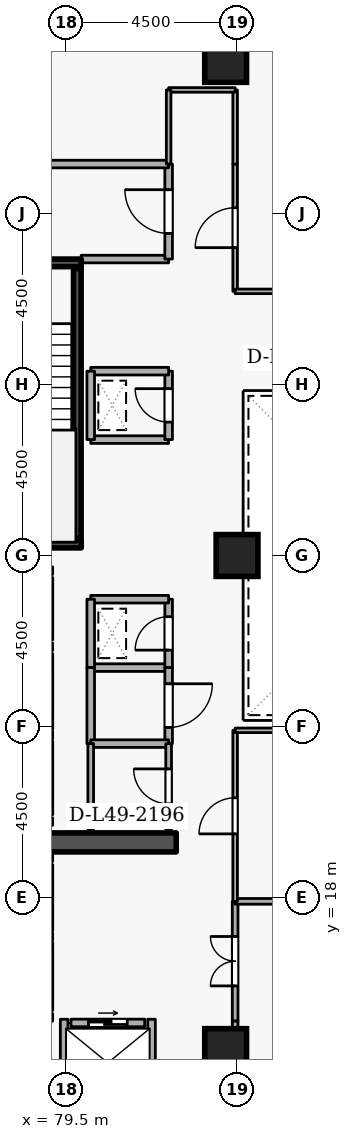
"""IFC4 building model, lengths in metres.
Left out: names, types, materials, properties, quantities, classifications, styles, units other than length and angle.
Written with IfcOpenShell. Run it as: python <this file> out.ifc"""

import sys

from ifc_helpers import new_model, si_unit, direction, frame, frame_2d, origin, origin_2d, place, context, subcontext, project, spatial, rectangle, extrude, element, fill, save


model = new_model("IFC4")
c1 = context("Model", 3, precision=1e-05, world=origin(), true_north=direction((0.0, 1.0)))
c2 = subcontext(c1, "Body", "Model", "MODEL_VIEW")
j1 = project(units=[si_unit("LENGTHUNIT", "METRE"), si_unit("PLANEANGLEUNIT", "RADIAN")], contexts=[c1])
p1 = place(None, origin())
s1 = spatial("IfcSite", under=j1, at=p1, CompositionType="ELEMENT")
p2 = place(p1, origin())
s2 = spatial("IfcBuilding", under=s1, at=p2, CompositionType="ELEMENT")
p3 = place(p2, frame((0.0, 0.0, 185.7)))
s3 = spatial("IfcBuildingStorey", under=s2, at=p3, CompositionType="ELEMENT", Elevation=185.7)
p4 = place(p3, frame((76.6, 19.45, 0.0), z_axis=(0.0, 0.0, 1.0), x_axis=(1.0, 0.0, 0.0)))
e1 = element("IfcWall", 1, at=p4, inside=s3, PredefinedType="SHEAR", context=c2, shape_type="SweptSolid", body=[
    extrude(rectangle(XDim=5.8, YDim=0.5, at=frame_2d((2.9, 0.0))), origin(), (0.0, 0.0, 1.0), 3.6),
])
for number, where, z_axis, x_axis in (
    (2, (83.7, 14.0, 0.0), (0.0, 0.0, 1.0), (1.0, 0.0, 0.0)),
    (3, (83.7, 40.0, 0.0), (0.0, 0.0, 1.0), (1.0, 0.0, 0.0)),
    (4, (84.0, 27.0, 0.0), (0.0, 0.0, 1.0), (1.0, 0.0, 0.0)),
):
    element("IfcColumn", number, at=place(p3, frame(where, z_axis=z_axis, x_axis=x_axis)), inside=s3, PredefinedType="COLUMN", context=c2, shape_type="SweptSolid", body=[
        extrude(rectangle(XDim=1.1, YDim=1.1, at=origin_2d()), origin(), (0.0, 0.0, 1.0), 3.6),
    ])
p5 = place(p3, frame((79.05, 24.78, 0.0), z_axis=(0.0, 0.0, 1.0), x_axis=(0.0, 1.0, 0.0)))
e5 = element("IfcWall", 5, at=p5, inside=s3, PredefinedType="STANDARD", context=c2, shape_type="SweptSolid", body=[
    extrude(rectangle(XDim=1.64, YDim=0.2, at=frame_2d((0.82, 0.0))), origin(), (0.0, 0.0, 1.0), 3.34),
])
p6 = place(p5, frame((0.31, 0.0, 0.0)))
e6 = element("IfcOpeningElement", 6, at=p6, cuts=e5, PredefinedType="OPENING", context=c2, shape_type="SweptSolid", body=[
    extrude(rectangle(XDim=1.02, YDim=2.06, at=frame_2d((0.51, 1.03))), frame((0.0, 0.11, 0.0), z_axis=(0.0, -1.0, 0.0), x_axis=(1.0, 0.0, 0.0)), (0.0, 0.0, 1.0), 0.22),
])
p7 = place(p3, frame((79.05, 22.43, 0.0), z_axis=(0.0, 0.0, 1.0), x_axis=(0.0, 1.0, 0.0)))
e7 = element("IfcWall", 7, at=p7, inside=s3, PredefinedType="STANDARD", context=c2, shape_type="SweptSolid", body=[
    extrude(rectangle(XDim=1.99, YDim=0.2, at=frame_2d((0.995, 0.0))), origin(), (0.0, 0.0, 1.0), 3.34),
])
p8 = place(p7, frame((0.485, 0.0, 0.0)))
e8 = element("IfcOpeningElement", 8, at=p8, cuts=e7, PredefinedType="OPENING", context=c2, shape_type="SweptSolid", body=[
    extrude(rectangle(XDim=1.02, YDim=2.06, at=frame_2d((0.51, 1.03))), frame((0.0, 0.11, 0.0), z_axis=(0.0, -1.0, 0.0), x_axis=(1.0, 0.0, 0.0)), (0.0, 0.0, 1.0), 0.22),
])
p9 = place(p3, frame((79.05, 20.18, 0.0), z_axis=(0.0, 0.0, 1.0), x_axis=(0.0, 1.0, 0.0)))
e9 = element("IfcWall", 9, at=p9, inside=s3, PredefinedType="STANDARD", context=c2, shape_type="SweptSolid", body=[
    extrude(rectangle(XDim=1.94, YDim=0.2, at=frame_2d((0.97, 0.0))), origin(), (0.0, 0.0, 1.0), 3.34),
])
p10 = place(p9, frame((0.46, 0.0, 0.0)))
e10 = element("IfcOpeningElement", 10, at=p10, cuts=e9, PredefinedType="OPENING", context=c2, shape_type="SweptSolid", body=[
    extrude(rectangle(XDim=1.02, YDim=2.06, at=frame_2d((0.51, 1.03))), frame((0.0, 0.11, 0.0), z_axis=(0.0, -1.0, 0.0), x_axis=(1.0, 0.0, 0.0)), (0.0, 0.0, 1.0), 0.22),
])
p11 = place(p3, frame((79.05, 17.13, 0.0), z_axis=(0.0, 0.0, 1.0), x_axis=(0.0, 1.0, 0.0)))
e11 = element("IfcWall", 11, at=p11, inside=s3, PredefinedType="STANDARD", context=c2, shape_type="SweptSolid", body=[
    extrude(rectangle(XDim=1.74, YDim=0.2, at=frame_2d((0.87, 0.0))), origin(), (0.0, 0.0, 1.0), 3.34),
])
p12 = place(p11, frame((0.36, 0.0, 0.0)))
e12 = element("IfcOpeningElement", 12, at=p12, cuts=e11, PredefinedType="OPENING", context=c2, shape_type="SweptSolid", body=[
    extrude(rectangle(XDim=1.02, YDim=2.06, at=frame_2d((0.51, 1.03))), frame((0.0, 0.11, 0.0), z_axis=(0.0, -1.0, 0.0), x_axis=(1.0, 0.0, 0.0)), (0.0, 0.0, 1.0), 0.22),
])
p13 = place(p3, frame((79.05, 15.03, 0.0), z_axis=(0.0, 0.0, 1.0), x_axis=(0.0, 1.0, 0.0)))
e13 = element("IfcWall", 13, at=p13, inside=s3, PredefinedType="STANDARD", context=c2, shape_type="SweptSolid", body=[
    extrude(rectangle(XDim=1.79, YDim=0.2, at=frame_2d((0.895, 0.0))), origin(), (0.0, 0.0, 1.0), 3.34),
])
p14 = place(p13, frame((0.385, 0.0, 0.0)))
e14 = element("IfcOpeningElement", 14, at=p14, cuts=e13, PredefinedType="OPENING", context=c2, shape_type="SweptSolid", body=[
    extrude(rectangle(XDim=1.02, YDim=2.06, at=frame_2d((0.51, 1.03))), frame((0.0, 0.11, 0.0), z_axis=(0.0, -1.0, 0.0), x_axis=(1.0, 0.0, 0.0)), (0.0, 0.0, 1.0), 0.22),
])
p15 = place(p3, frame((79.63, 14.7, 0.0), z_axis=(0.0, 0.0, 1.0), x_axis=(1.0, 0.0, 0.0)))
e15 = element("IfcWall", 15, at=p15, inside=s3, PredefinedType="STANDARD", context=c2, shape_type="SweptSolid", body=[
    extrude(rectangle(XDim=1.94, YDim=0.2, at=frame_2d((0.97, 0.0))), origin(), (0.0, 0.0, 1.0), 3.34),
])
p16 = place(p15, frame((0.46, 0.0, 0.0)))
e16 = element("IfcOpeningElement", 16, at=p16, cuts=e15, PredefinedType="OPENING", context=c2, shape_type="SweptSolid", body=[
    extrude(rectangle(XDim=1.02, YDim=2.06, at=frame_2d((0.51, 1.03))), frame((0.0, 0.11, 0.0), z_axis=(0.0, -1.0, 0.0), x_axis=(1.0, 0.0, 0.0)), (0.0, 0.0, 1.0), 0.22),
])
for number, where, z_axis, x_axis in (
    (17, (81.75, 12.612, 0.0), (0.0, 0.0, 1.0), (0.0, 1.0, 0.0)),
    (18, (79.45, 12.612, 0.0), (0.0, 0.0, 1.0), (0.0, 1.0, 0.0)),
):
    element("IfcWall", number, at=place(p3, frame(where, z_axis=z_axis, x_axis=x_axis)), inside=s3, PredefinedType="STANDARD", context=c2, shape_type="SweptSolid", body=[
        extrude(rectangle(XDim=2.186, YDim=0.2, at=frame_2d((1.093, 0.0))), origin(), (0.0, 0.0, 1.0), 3.34),
    ])
p17 = place(p3, frame((76.55, 34.7, 0.0), z_axis=(0.0, 0.0, 1.0), x_axis=(1.0, 0.0, 0.0)))
e19 = element("IfcWall", 19, at=p17, inside=s3, PredefinedType="SHEAR", context=c2, shape_type="SweptSolid", body=[
    extrude(rectangle(XDim=3.35, YDim=0.2, at=frame_2d((1.675, 0.0))), origin(), (0.0, 0.0, 1.0), 3.6),
])
p18 = place(p17, frame((1.125, 0.0, 0.0)))
e20 = element("IfcOpeningElement", 20, at=p18, cuts=e19, PredefinedType="OPENING", context=c2, shape_type="SweptSolid", body=[
    extrude(rectangle(XDim=1.1, YDim=2.1, at=frame_2d((0.55, 1.05))), frame((0.0, 0.11, 0.0), z_axis=(0.0, -1.0, 0.0), x_axis=(1.0, 0.0, 0.0)), (0.0, 0.0, 1.0), 0.22),
])
p19 = place(p3, frame((79.9, 27.3, 0.0), z_axis=(0.0, 0.0, 1.0), x_axis=(-1.0, 0.0, 0.0)))
e21 = element("IfcWall", 21, at=p19, inside=s3, PredefinedType="SHEAR", context=c2, shape_type="SweptSolid", body=[
    extrude(rectangle(XDim=3.35, YDim=0.2, at=frame_2d((1.675, 0.0))), origin(), (0.0, 0.0, 1.0), 3.6),
])
p20 = place(p3, frame((79.797, 27.45, 0.0), z_axis=(0.0, 0.0, 1.0), x_axis=(0.0, 1.0, 0.0)))
e22 = element("IfcWall", 22, at=p20, inside=s3, PredefinedType="SHEAR", context=c2, shape_type="SweptSolid", body=[
    extrude(rectangle(XDim=7.1, YDim=0.2, at=frame_2d((3.55, 0.0))), origin(), (0.0, 0.0, 1.0), 3.6),
])
p21 = place(p3, frame((79.9, 34.8, 0.0), z_axis=(0.0, 0.0, 1.0), x_axis=(1.0, 0.0, 0.0)))
e23 = element("IfcWall", 23, at=p21, inside=s3, PredefinedType="STANDARD", context=c2, shape_type="SweptSolid", body=[
    extrude(rectangle(XDim=2.3, YDim=0.2, at=frame_2d((1.15, 0.0))), origin(), (0.0, 0.0, 1.0), 2.545),
])
p22 = place(p3, frame((82.2, 34.8, 0.0), z_axis=(0.0, 0.0, 1.0), x_axis=(0.0, 1.0, 0.0)))
e24 = element("IfcWall", 24, at=p22, inside=s3, PredefinedType="STANDARD", context=c2, shape_type="SweptSolid", body=[
    extrude(rectangle(XDim=2.5, YDim=0.2, at=frame_2d((1.25, 0.0))), origin(), (0.0, 0.0, 1.0), 3.34),
])
p23 = place(p22, frame((0.675, 0.0, 0.0)))
e25 = element("IfcOpeningElement", 25, at=p23, cuts=e24, PredefinedType="OPENING", context=c2, shape_type="SweptSolid", body=[
    extrude(rectangle(XDim=1.15, YDim=2.1, at=frame_2d((0.575, 1.05))), frame((0.0, 0.11, 0.0), z_axis=(0.0, -1.0, 0.0), x_axis=(1.0, 0.0, 0.0)), (0.0, 0.0, 1.0), 0.22),
])
p24 = place(p3, frame((82.2, 37.3, 0.0), z_axis=(0.0, 0.0, 1.0), x_axis=(-1.0, 0.0, 0.0)))
e26 = element("IfcWall", 26, at=p24, inside=s3, PredefinedType="STANDARD", context=c2, shape_type="SweptSolid", body=[
    extrude(rectangle(XDim=5.7, YDim=0.2, at=frame_2d((2.85, 0.0))), origin(), (0.0, 0.0, 1.0), 3.34),
])
p25 = place(p3, frame((80.15, 24.05, 0.0), z_axis=(0.0, 0.0, 1.0), x_axis=(1.0, 0.0, 0.0)))
e27 = element("IfcWall", 27, at=p25, inside=s3, PredefinedType="STANDARD", context=c2, shape_type="SweptSolid", body=[
    extrude(rectangle(XDim=2.05, YDim=0.2, at=frame_2d((1.025, 0.0))), origin(), (0.0, 0.0, 1.0), 3.34),
])
p26 = place(p3, frame((82.2, 24.05, 0.0), z_axis=(0.0, 0.0, 1.0), x_axis=(0.0, 1.0, 0.0)))
e28 = element("IfcWall", 28, at=p26, inside=s3, PredefinedType="STANDARD", context=c2, shape_type="SweptSolid", body=[
    extrude(rectangle(XDim=1.8, YDim=0.2, at=frame_2d((0.9, 0.0))), origin(), (0.0, 0.0, 1.0), 3.34),
])
p27 = place(p26, frame((0.46, 0.0, 0.0)))
e29 = element("IfcOpeningElement", 29, at=p27, cuts=e28, PredefinedType="OPENING", context=c2, shape_type="SweptSolid", body=[
    extrude(rectangle(XDim=0.88, YDim=2.04, at=frame_2d((0.44, 1.02))), frame((0.0, 0.11, 0.0), z_axis=(0.0, -1.0, 0.0), x_axis=(1.0, 0.0, 0.0)), (0.0, 0.0, 1.0), 0.22),
])
p28 = place(p3, frame((82.2, 25.85, 0.0), z_axis=(0.0, 0.0, 1.0), x_axis=(-1.0, 0.0, 0.0)))
e30 = element("IfcWall", 30, at=p28, inside=s3, PredefinedType="STANDARD", context=c2, shape_type="SweptSolid", body=[
    extrude(rectangle(XDim=2.05, YDim=0.2, at=frame_2d((1.025, 0.0))), origin(), (0.0, 0.0, 1.0), 3.34),
])
p29 = place(p3, frame((80.15, 25.85, 0.0), z_axis=(0.0, 0.0, 1.0), x_axis=(0.0, -1.0, 0.0)))
e31 = element("IfcWall", 31, at=p29, inside=s3, PredefinedType="STANDARD", context=c2, shape_type="SweptSolid", body=[
    extrude(rectangle(XDim=1.8, YDim=0.2, at=frame_2d((0.9, 0.0))), origin(), (0.0, 0.0, 1.0), 3.34),
])
p30 = place(p3, frame((80.15, 30.05, 0.0), z_axis=(0.0, 0.0, 1.0), x_axis=(1.0, 0.0, 0.0)))
e32 = element("IfcWall", 32, at=p30, inside=s3, PredefinedType="STANDARD", context=c2, shape_type="SweptSolid", body=[
    extrude(rectangle(XDim=2.05, YDim=0.2, at=frame_2d((1.025, 0.0))), origin(), (0.0, 0.0, 1.0), 3.34),
])
p31 = place(p3, frame((82.2, 30.05, 0.0), z_axis=(0.0, 0.0, 1.0), x_axis=(0.0, 1.0, 0.0)))
e33 = element("IfcWall", 33, at=p31, inside=s3, PredefinedType="STANDARD", context=c2, shape_type="SweptSolid", body=[
    extrude(rectangle(XDim=1.8, YDim=0.2, at=frame_2d((0.9, 0.0))), origin(), (0.0, 0.0, 1.0), 3.34),
])
p32 = place(p31, frame((0.46, 0.0, 0.0)))
e34 = element("IfcOpeningElement", 34, at=p32, cuts=e33, PredefinedType="OPENING", context=c2, shape_type="SweptSolid", body=[
    extrude(rectangle(XDim=0.88, YDim=2.04, at=frame_2d((0.44, 1.02))), frame((0.0, 0.11, 0.0), z_axis=(0.0, -1.0, 0.0), x_axis=(1.0, 0.0, 0.0)), (0.0, 0.0, 1.0), 0.22),
])
p33 = place(p3, frame((82.2, 31.85, 0.0), z_axis=(0.0, 0.0, 1.0), x_axis=(-1.0, 0.0, 0.0)))
e35 = element("IfcWall", 35, at=p33, inside=s3, PredefinedType="STANDARD", context=c2, shape_type="SweptSolid", body=[
    extrude(rectangle(XDim=2.05, YDim=0.2, at=frame_2d((1.025, 0.0))), origin(), (0.0, 0.0, 1.0), 3.34),
])
p34 = place(p3, frame((80.15, 31.85, 0.0), z_axis=(0.0, 0.0, 1.0), x_axis=(0.0, -1.0, 0.0)))
e36 = element("IfcWall", 36, at=p34, inside=s3, PredefinedType="STANDARD", context=c2, shape_type="SweptSolid", body=[
    extrude(rectangle(XDim=1.8, YDim=0.2, at=frame_2d((0.9, 0.0))), origin(), (0.0, 0.0, 1.0), 3.34),
])
p35 = place(p3, frame((80.15, 22.05, 0.0), z_axis=(0.0, 0.0, 1.0), x_axis=(0.0, 1.0, 0.0)))
e37 = element("IfcWall", 37, at=p35, inside=s3, PredefinedType="STANDARD", context=c2, shape_type="SweptSolid", body=[
    extrude(rectangle(XDim=2.0, YDim=0.2, at=frame_2d((1.0, 0.0))), origin(), (0.0, 0.0, 1.0), 3.34),
])
p36 = place(p3, frame((82.2, 24.05, 0.0), z_axis=(0.0, 0.0, 1.0), x_axis=(0.0, -1.0, 0.0)))
e38 = element("IfcWall", 38, at=p36, inside=s3, PredefinedType="STANDARD", context=c2, shape_type="SweptSolid", body=[
    extrude(rectangle(XDim=2.0, YDim=0.2, at=frame_2d((1.0, 0.0))), origin(), (0.0, 0.0, 1.0), 3.34),
])
p37 = place(p36, frame((0.425, 0.0, 0.0)))
e39 = element("IfcOpeningElement", 39, at=p37, cuts=e38, PredefinedType="OPENING", context=c2, shape_type="SweptSolid", body=[
    extrude(rectangle(XDim=1.15, YDim=2.1, at=frame_2d((0.575, 1.05))), frame((0.0, 0.11, 0.0), z_axis=(0.0, -1.0, 0.0), x_axis=(1.0, 0.0, 0.0)), (0.0, 0.0, 1.0), 0.22),
])
p38 = place(p3, frame((82.2, 22.05, 0.0), z_axis=(0.0, 0.0, 1.0), x_axis=(-1.0, 0.0, 0.0)))
e40 = element("IfcWall", 40, at=p38, inside=s3, PredefinedType="STANDARD", context=c2, shape_type="SweptSolid", body=[
    extrude(rectangle(XDim=2.05, YDim=0.2, at=frame_2d((1.025, 0.0))), origin(), (0.0, 0.0, 1.0), 3.34),
])
p39 = place(p3, frame((82.2, 19.8, 0.0), z_axis=(0.0, 0.0, 1.0), x_axis=(0.0, 1.0, 0.0)))
e41 = element("IfcWall", 41, at=p39, inside=s3, PredefinedType="PARTITIONING", context=c2, shape_type="SweptSolid", body=[
    extrude(rectangle(XDim=2.25, YDim=0.15, at=frame_2d((1.125, 0.0))), origin(), (0.0, 0.0, 1.0), 3.34),
])
p40 = place(p39, frame((0.665, 0.0, 0.0)))
e42 = element("IfcOpeningElement", 42, at=p40, cuts=e41, PredefinedType="OPENING", context=c2, shape_type="SweptSolid", body=[
    extrude(rectangle(XDim=0.92, YDim=2.08, at=frame_2d((0.46, 1.04))), frame((0.0, 0.085, 0.0), z_axis=(0.0, -1.0, 0.0), x_axis=(1.0, 0.0, 0.0)), (0.0, 0.0, 1.0), 0.17),
])
p41 = place(p3, frame((80.15, 22.05, 0.0), z_axis=(0.0, 0.0, 1.0), x_axis=(0.0, -1.0, 0.0)))
e43 = element("IfcWall", 43, at=p41, inside=s3, PredefinedType="PARTITIONING", context=c2, shape_type="SweptSolid", body=[
    extrude(rectangle(XDim=2.25, YDim=0.15, at=frame_2d((1.125, 0.0))), origin(), (0.0, 0.0, 1.0), 3.34),
])
p42 = place(p3, frame((83.95, 14.75, 0.0), z_axis=(0.0, 0.0, 1.0), x_axis=(0.0, 1.0, 0.0)))
e44 = element("IfcWall", 44, at=p42, inside=s3, PredefinedType="PARTITIONING", context=c2, shape_type="SweptSolid", body=[
    extrude(rectangle(XDim=3.15, YDim=0.15, at=frame_2d((1.575, 0.0))), origin(), (0.0, 0.0, 1.0), 3.34),
])
p43 = place(p42, frame((0.925, 0.0, 0.0)))
e45 = element("IfcOpeningElement", 45, at=p43, cuts=e44, PredefinedType="OPENING", context=c2, shape_type="SweptSolid", body=[
    extrude(rectangle(XDim=1.3, YDim=2.12, at=frame_2d((0.65, 1.06))), frame((0.0, 0.085, 0.0), z_axis=(0.0, -1.0, 0.0), x_axis=(1.0, 0.0, 0.0)), (0.0, 0.0, 1.0), 0.17),
])
p44 = place(p3, frame((83.95, 17.9, 0.0), z_axis=(0.0, 0.0, 1.0), x_axis=(1.0, 0.0, 0.0)))
e46 = element("IfcWall", 46, at=p44, inside=s3, PredefinedType="PARTITIONING", context=c2, shape_type="SweptSolid", body=[
    extrude(rectangle(XDim=4.55, YDim=0.15, at=frame_2d((2.275, 0.0))), origin(), (0.0, 0.0, 1.0), 3.34),
])
p45 = place(p3, frame((83.95, 12.4, 0.0), z_axis=(0.0, 0.0, 1.0), x_axis=(0.0, 1.0, 0.0)))
e47 = element("IfcWall", 47, at=p45, inside=s3, PredefinedType="PARTITIONING", context=c2, shape_type="SweptSolid", body=[
    extrude(rectangle(XDim=2.35, YDim=0.15, at=frame_2d((1.175, 0.0))), origin(), (0.0, 0.0, 1.0), 3.34),
])
p46 = place(p3, frame((83.95, 17.9, 0.0), z_axis=(0.0, 0.0, 1.0), x_axis=(0.0, 1.0, 0.0)))
e48 = element("IfcWall", 48, at=p46, inside=s3, PredefinedType="PARTITIONING", context=c2, shape_type="SweptSolid", body=[
    extrude(rectangle(XDim=4.5, YDim=0.12, at=frame_2d((2.25, 0.0))), origin(), (0.0, 0.0, 1.0), 3.34),
])
p47 = place(p46, frame((1.775, 0.0, 0.0)))
e49 = element("IfcOpeningElement", 49, at=p47, cuts=e48, PredefinedType="OPENING", context=c2, shape_type="SweptSolid", body=[
    extrude(rectangle(XDim=0.95, YDim=2.1, at=frame_2d((0.475, 1.05))), frame((0.0, 0.07, 0.0), z_axis=(0.0, -1.0, 0.0), x_axis=(1.0, 0.0, 0.0)), (0.0, 0.0, 1.0), 0.14),
])
p48 = place(p3, frame((83.95, 22.4, 0.0), z_axis=(0.0, 0.0, 1.0), x_axis=(1.0, 0.0, 0.0)))
e50 = element("IfcWall", 50, at=p48, inside=s3, PredefinedType="PARTITIONING", context=c2, shape_type="SweptSolid", body=[
    extrude(rectangle(XDim=9.1, YDim=0.12, at=frame_2d((4.55, 0.0))), origin(), (0.0, 0.0, 1.0), 3.34),
])
p49 = place(p3, frame((83.95, 33.95, 0.0), z_axis=(0.0, 0.0, 1.0), x_axis=(0.0, 1.0, 0.0)))
e51 = element("IfcWall", 51, at=p49, inside=s3, PredefinedType="PARTITIONING", context=c2, shape_type="SweptSolid", body=[
    extrude(rectangle(XDim=3.35, YDim=0.12, at=frame_2d((1.675, 0.0))), origin(), (0.0, 0.0, 1.0), 3.34),
])
p50 = place(p49, frame((1.15, 0.0, 0.0)))
e52 = element("IfcOpeningElement", 52, at=p50, cuts=e51, PredefinedType="OPENING", context=c2, shape_type="SweptSolid", body=[
    extrude(rectangle(XDim=1.05, YDim=2.1, at=frame_2d((0.525, 1.05))), frame((0.0, 0.07, 0.0), z_axis=(0.0, -1.0, 0.0), x_axis=(1.0, 0.0, 0.0)), (0.0, 0.0, 1.0), 0.14),
])
p51 = place(p3, frame((83.95, 37.3, 0.0), z_axis=(0.0, 0.0, 1.0), x_axis=(0.0, 1.0, 0.0)))
e53 = element("IfcWall", 53, at=p51, inside=s3, PredefinedType="PARTITIONING", context=c2, shape_type="SweptSolid", body=[
    extrude(rectangle(XDim=1.95, YDim=0.12, at=frame_2d((0.975, 0.0))), origin(), (0.0, 0.0, 1.0), 3.34),
])
p52 = place(p3, frame((83.95, 39.25, 0.0), z_axis=(0.0, 0.0, 1.0), x_axis=(-1.0, 0.0, 0.0)))
e54 = element("IfcWall", 54, at=p52, inside=s3, PredefinedType="PARTITIONING", context=c2, shape_type="SweptSolid", body=[
    extrude(rectangle(XDim=1.75, YDim=0.12, at=frame_2d((0.875, 0.0))), origin(), (0.0, 0.0, 1.0), 3.34),
])
p53 = place(p3, frame((82.2, 39.25, 0.0), z_axis=(0.0, 0.0, 1.0), x_axis=(0.0, -1.0, 0.0)))
e55 = element("IfcWall", 55, at=p53, inside=s3, PredefinedType="PARTITIONING", context=c2, shape_type="SweptSolid", body=[
    extrude(rectangle(XDim=1.95, YDim=0.12, at=frame_2d((0.975, 0.0))), origin(), (0.0, 0.0, 1.0), 3.34),
])
p54 = place(p3, frame((86.25, 33.95, 0.0), z_axis=(0.0, 0.0, 1.0), x_axis=(-1.0, 0.0, 0.0)))
e56 = element("IfcWall", 56, at=p54, inside=s3, PredefinedType="PARTITIONING", context=c2, shape_type="SweptSolid", body=[
    extrude(rectangle(XDim=2.3, YDim=0.12, at=frame_2d((1.15, 0.0))), origin(), (0.0, 0.0, 1.0), 3.34),
])
p55 = place(p16, origin())
e57 = element("IfcDoor", 57, at=p55, inside=s3, OperationType="SLIDING_TO_LEFT", PredefinedType="DOOR", context=c2, shape_type="SweptSolid", body=[
    extrude(rectangle(XDim=1.02, YDim=2.06, at=frame_2d((0.51, 1.03))), frame((0.0, 0.025, 0.0), z_axis=(0.0, -1.0, 0.0), x_axis=(1.0, 0.0, 0.0)), (0.0, 0.0, 1.0), 0.05),
])
fill(e16, e57)
p56 = place(p23, origin())
e58 = element("IfcDoor", 58, at=p56, inside=s3, OperationType="SINGLE_SWING_RIGHT", PredefinedType="DOOR", context=c2, shape_type="SweptSolid", body=[
    extrude(rectangle(XDim=1.15, YDim=2.1, at=frame_2d((0.575, 1.05))), frame((0.0, 0.025, 0.0), z_axis=(0.0, -1.0, 0.0), x_axis=(1.0, 0.0, 0.0)), (0.0, 0.0, 1.0), 0.05),
])
fill(e25, e58)
p57 = place(p27, origin())
e59 = element("IfcDoor", 59, at=p57, inside=s3, OperationType="SINGLE_SWING_LEFT", PredefinedType="DOOR", context=c2, shape_type="SweptSolid", body=[
    extrude(rectangle(XDim=0.88, YDim=2.04, at=frame_2d((0.44, 1.02))), frame((0.0, 0.025, 0.0), z_axis=(0.0, -1.0, 0.0), x_axis=(1.0, 0.0, 0.0)), (0.0, 0.0, 1.0), 0.05),
])
fill(e29, e59)
p58 = place(p32, origin())
e60 = element("IfcDoor", 60, at=p58, inside=s3, OperationType="SINGLE_SWING_RIGHT", PredefinedType="DOOR", context=c2, shape_type="SweptSolid", body=[
    extrude(rectangle(XDim=0.88, YDim=2.04, at=frame_2d((0.44, 1.02))), frame((0.0, 0.025, 0.0), z_axis=(0.0, -1.0, 0.0), x_axis=(1.0, 0.0, 0.0)), (0.0, 0.0, 1.0), 0.05),
])
fill(e34, e60)
p59 = place(p40, origin())
e61 = element("IfcDoor", 61, at=p59, inside=s3, OperationType="SINGLE_SWING_RIGHT", PredefinedType="DOOR", context=c2, shape_type="SweptSolid", body=[
    extrude(rectangle(XDim=0.92, YDim=2.08, at=frame_2d((0.46, 1.04))), frame((0.0, 0.025, 0.0), z_axis=(0.0, -1.0, 0.0), x_axis=(1.0, 0.0, 0.0)), (0.0, 0.0, 1.0), 0.05),
])
fill(e42, e61)
p60 = place(p37, origin())
e62 = element("IfcDoor", 62, at=p60, inside=s3, OperationType="SINGLE_SWING_LEFT", PredefinedType="DOOR", context=c2, shape_type="SweptSolid", body=[
    extrude(rectangle(XDim=1.15, YDim=2.1, at=frame_2d((0.575, 1.05))), frame((0.0, 0.025, 0.0), z_axis=(0.0, -1.0, 0.0), x_axis=(1.0, 0.0, 0.0)), (0.0, 0.0, 1.0), 0.05),
])
fill(e39, e62)
p61 = place(p43, origin())
e63 = element("IfcDoor", 63, at=p61, inside=s3, OperationType="DOUBLE_DOOR_SINGLE_SWING", PredefinedType="DOOR", context=c2, shape_type="SweptSolid", body=[
    extrude(rectangle(XDim=1.3, YDim=2.12, at=frame_2d((0.65, 1.06))), frame((0.0, 0.025, 0.0), z_axis=(0.0, -1.0, 0.0), x_axis=(1.0, 0.0, 0.0)), (0.0, 0.0, 1.0), 0.05),
])
fill(e45, e63)
p62 = place(p47, origin())
e64 = element("IfcDoor", 64, at=p62, inside=s3, OperationType="SINGLE_SWING_LEFT", PredefinedType="DOOR", context=c2, shape_type="SweptSolid", body=[
    extrude(rectangle(XDim=0.95, YDim=2.1, at=frame_2d((0.475, 1.05))), frame((0.0, 0.025, 0.0), z_axis=(0.0, -1.0, 0.0), x_axis=(1.0, 0.0, 0.0)), (0.0, 0.0, 1.0), 0.05),
])
fill(e49, e64)
p63 = place(p50, origin())
e65 = element("IfcDoor", 65, at=p63, inside=s3, OperationType="SINGLE_SWING_LEFT", PredefinedType="DOOR", context=c2, shape_type="SweptSolid", body=[
    extrude(rectangle(XDim=1.05, YDim=2.1, at=frame_2d((0.525, 1.05))), frame((0.0, 0.025, 0.0), z_axis=(0.0, -1.0, 0.0), x_axis=(1.0, 0.0, 0.0)), (0.0, 0.0, 1.0), 0.05),
])
fill(e52, e65)
save(model, sys.argv[1])
